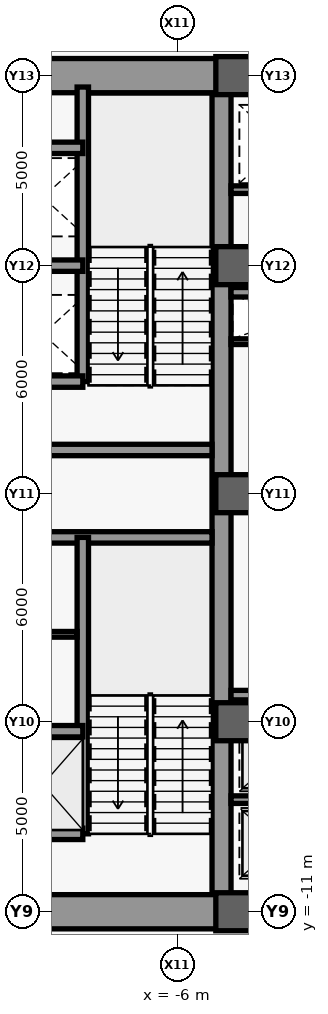
"""IFC4 building model, lengths in metres.
Left out: names, types, materials, properties, quantities, classifications, styles, units other than length and angle.
Written with IfcOpenShell. Run it as: python <this file> out.ifc"""

import sys

from ifc_helpers import new_model, si_unit, direction, frame, frame_2d, origin, origin_2d, place, context, subcontext, project, spatial, rectangle, extrude, source, transform, mapped, element, save


model = new_model("IFC4")
c1 = context("Model", 3, precision=1e-05, world=origin(), true_north=direction((0.0, 1.0)))
c2 = subcontext(c1, "Body", "Model", "MODEL_VIEW")
j1 = project(units=[si_unit("LENGTHUNIT", "METRE"), si_unit("PLANEANGLEUNIT", "RADIAN")], contexts=[c1])
p1 = place(None, origin())
s1 = spatial("IfcSite", under=j1, at=p1, CompositionType="ELEMENT")
p2 = place(p1, origin())
s2 = spatial("IfcBuilding", under=s1, at=p2, CompositionType="ELEMENT")
p3 = place(p2, frame((0.0, 0.0, 17.4)))
s3 = spatial("IfcBuildingStorey", under=s2, at=p3, CompositionType="ELEMENT", Elevation=17.4)
m1 = source(origin(), c2, "Body", "SweptSolid", [
    extrude(rectangle(XDim=21.4, YDim=0.5, at=frame_2d((10.7, 0.0))), origin(), (0.0, 0.0, 1.0), 4.48),
])
p4 = place(p3, frame((-4.85, -10.7, 0.0), z_axis=(0.0, 0.0, 1.0), x_axis=(0.0, 1.0, 0.0)))
e1 = element("IfcWall", 1, at=p4, inside=s3, PredefinedType="SHEAR", context=c2, shape_type="MappedRepresentation", body=[
    mapped(m1, transform((0.0, 0.0, 0.0), scale=1.0)),
])
m2 = source(origin(), c2, "Body", "SweptSolid", [
    extrude(rectangle(XDim=5.85, YDim=0.9, at=frame_2d((2.925, 0.0))), origin(), (0.0, 0.0, 1.0), 4.48),
])
for number, where, z_axis, x_axis in (
    (2, (-10.7, -11.0, 0.0), (0.0, 0.0, 1.0), (1.0, 0.0, 0.0)),
    (3, (-10.7, 11.0, 0.0), (0.0, 0.0, 1.0), (1.0, 0.0, 0.0)),
):
    element("IfcWall", number, at=place(p3, frame(where, z_axis=z_axis, x_axis=x_axis)), inside=s3, PredefinedType="SHEAR", context=c2, shape_type="MappedRepresentation", body=[
        mapped(m2, transform((0.0, 0.0, 0.0), scale=1.0)),
    ])
m3 = source(origin(), c2, "Body", "SweptSolid", [
    extrude(rectangle(XDim=5.6, YDim=0.3, at=frame_2d((2.8, 0.0))), origin(), (0.0, 0.0, 1.0), 4.48),
])
for number, where, z_axis, x_axis in (
    (4, (-10.7, -1.15, 0.0), (0.0, 0.0, 1.0), (1.0, 0.0, 0.0)),
    (5, (-10.7, 1.15, 0.0), (0.0, 0.0, 1.0), (1.0, 0.0, 0.0)),
):
    element("IfcWall", number, at=place(p3, frame(where, z_axis=z_axis, x_axis=x_axis)), inside=s3, PredefinedType="SHEAR", context=c2, shape_type="MappedRepresentation", body=[
        mapped(m3, transform((0.0, 0.0, 0.0), scale=1.0)),
    ])
m4 = source(origin(), c2, "Body", "SweptSolid", [
    extrude(rectangle(XDim=9.2, YDim=0.5, at=frame_2d((4.6, 0.0))), origin(), (0.0, 0.0, 1.0), 4.48),
])
p5 = place(p3, frame((-4.6, -11.0, 0.0), z_axis=(0.0, 0.0, 1.0), x_axis=(1.0, 0.0, 0.0)))
e6 = element("IfcWall", 6, at=p5, inside=s3, PredefinedType="SHEAR", context=c2, shape_type="MappedRepresentation", body=[
    mapped(m4, transform((0.0, 0.0, 0.0), scale=1.0)),
])
m5 = source(origin(), c2, "Body", "SweptSolid", [
    extrude(rectangle(XDim=1.8, YDim=2.25, at=frame_2d((0.9, 1.125))), frame((0.0, 0.26, 0.0), z_axis=(0.0, -1.0, 0.0), x_axis=(1.0, 0.0, 0.0)), (0.0, 0.0, 1.0), 0.52),
])
p6 = place(p5, frame((3.7, 0.0, 0.0)))
e7 = element("IfcOpeningElement", 7, at=p6, cuts=e6, PredefinedType="OPENING", context=c2, shape_type="MappedRepresentation", body=[
    mapped(m5, transform((0.0, 0.0, 0.0), scale=1.0)),
])
p7 = place(p3, frame((-4.6, 11.0, 0.0), z_axis=(0.0, 0.0, 1.0), x_axis=(1.0, 0.0, 0.0)))
e8 = element("IfcWall", 8, at=p7, inside=s3, PredefinedType="SHEAR", context=c2, shape_type="MappedRepresentation", body=[
    mapped(m4, transform((0.0, 0.0, 0.0), scale=1.0)),
])
p8 = place(p7, frame((3.7, 0.0, 0.0)))
e9 = element("IfcOpeningElement", 9, at=p8, cuts=e8, PredefinedType="OPENING", context=c2, shape_type="MappedRepresentation", body=[
    mapped(m5, transform((0.0, 0.0, 0.0), scale=1.0)),
])
m6 = source(origin(), c2, "Body", "SweptSolid", [
    extrude(rectangle(XDim=1.0, YDim=1.0, at=origin_2d()), origin(), (0.0, 0.0, 1.0), 4.8),
])
for number, where, z_axis, x_axis in (
    (10, (-4.5, -11.0, 0.0), (0.0, 0.0, 1.0), (1.0, 0.0, 0.0)),
    (11, (-4.5, -6.0, 0.0), (0.0, 0.0, 1.0), (1.0, 0.0, 0.0)),
    (12, (-4.5, 0.0, 0.0), (0.0, 0.0, 1.0), (1.0, 0.0, 0.0)),
    (13, (-4.5, 6.0, 0.0), (0.0, 0.0, 1.0), (1.0, 0.0, 0.0)),
    (14, (-4.5, 11.0, 0.0), (0.0, 0.0, 1.0), (1.0, 0.0, 0.0)),
):
    element("IfcColumn", number, at=place(p3, frame(where, z_axis=z_axis, x_axis=x_axis)), inside=s3, PredefinedType="COLUMN", context=c2, shape_type="MappedRepresentation", body=[
        mapped(m6, transform((0.0, 0.0, 0.0), scale=1.0)),
    ])
m7 = source(origin(), c2, "Body", "SweptSolid", [
    extrude(rectangle(XDim=7.8, YDim=0.3, at=frame_2d((3.9, 0.0))), origin(), (0.0, 0.0, 1.0), 4.48),
])
p9 = place(p3, frame((-8.5, -8.95, 0.0), z_axis=(0.0, 0.0, 1.0), x_axis=(0.0, 1.0, 0.0)))
e15 = element("IfcWall", 15, at=p9, inside=s3, PredefinedType="SHEAR", context=c2, shape_type="MappedRepresentation", body=[
    mapped(m7, transform((0.0, 0.0, 0.0), scale=1.0)),
])
m8 = source(origin(), c2, "Body", "SweptSolid", [
    extrude(rectangle(XDim=2.2, YDim=0.3, at=frame_2d((1.1, 0.0))), origin(), (0.0, 0.0, 1.0), 4.48),
])
for number, where, z_axis, x_axis in (
    (16, (-10.7, -8.95, 0.0), (0.0, 0.0, 1.0), (1.0, 0.0, 0.0)),
    (17, (-10.7, -6.25, 0.0), (0.0, 0.0, 1.0), (1.0, 0.0, 0.0)),
):
    element("IfcWall", number, at=place(p3, frame(where, z_axis=z_axis, x_axis=x_axis)), inside=s3, PredefinedType="SHEAR", context=c2, shape_type="MappedRepresentation", body=[
        mapped(m8, transform((0.0, 0.0, 0.0), scale=1.0)),
    ])
m9 = source(origin(), c2, "Body", "SweptSolid", [
    extrude(rectangle(XDim=7.75, YDim=0.3, at=frame_2d((3.875, 0.0))), origin(), (0.0, 0.0, 1.0), 4.48),
])
p10 = place(p3, frame((-8.5, 2.95, 0.0), z_axis=(0.0, 0.0, 1.0), x_axis=(0.0, 1.0, 0.0)))
e18 = element("IfcWall", 18, at=p10, inside=s3, PredefinedType="SHEAR", context=c2, shape_type="MappedRepresentation", body=[
    mapped(m9, transform((0.0, 0.0, 0.0), scale=1.0)),
])
for number, where, z_axis, x_axis in (
    (19, (-10.7, 2.95, 0.0), (0.0, 0.0, 1.0), (1.0, 0.0, 0.0)),
    (20, (-10.7, 6.0, 0.0), (0.0, 0.0, 1.0), (1.0, 0.0, 0.0)),
    (21, (-10.7, 9.1, 0.0), (0.0, 0.0, 1.0), (1.0, 0.0, 0.0)),
):
    element("IfcWall", number, at=place(p3, frame(where, z_axis=z_axis, x_axis=x_axis)), inside=s3, PredefinedType="SHEAR", context=c2, shape_type="MappedRepresentation", body=[
        mapped(m8, transform((0.0, 0.0, 0.0), scale=1.0)),
    ])
m10 = source(origin(), c2, "Body", "SweptSolid", [
    extrude(rectangle(XDim=2.05, YDim=0.15, at=frame_2d((1.025, 0.0))), origin(), (0.0, 0.0, 1.0), 4.48),
])
p11 = place(p3, frame((-10.7, -3.7, 0.0), z_axis=(0.0, 0.0, 1.0), x_axis=(1.0, 0.0, 0.0)))
e22 = element("IfcWall", 22, at=p11, inside=s3, PredefinedType="PARTITIONING", context=c2, shape_type="MappedRepresentation", body=[
    mapped(m10, transform((0.0, 0.0, 0.0), scale=1.0)),
])
m11 = source(origin(), c2, "Body", "SweptSolid", [
    extrude(rectangle(XDim=3.45, YDim=0.15, at=frame_2d((1.725, 0.0))), origin(), (0.0, 0.0, 1.0), 4.48),
])
p12 = place(p3, frame((-4.6, 4.0, 0.0), z_axis=(0.0, 0.0, 1.0), x_axis=(1.0, 0.0, 0.0)))
e23 = element("IfcWall", 23, at=p12, inside=s3, PredefinedType="PARTITIONING", context=c2, shape_type="MappedRepresentation", body=[
    mapped(m11, transform((0.0, 0.0, 0.0), scale=1.0)),
])
m12 = source(origin(), c2, "Body", "SweptSolid", [
    extrude(rectangle(XDim=2.45, YDim=0.2, at=frame_2d((1.225, 0.0))), origin(), (0.0, 0.0, 1.0), 4.48),
])
p13 = place(p3, frame((-4.6, -8.05, 0.0), z_axis=(0.0, 0.0, 1.0), x_axis=(1.0, 0.0, 0.0)))
e24 = element("IfcWall", 24, at=p13, inside=s3, PredefinedType="SHEAR", context=c2, shape_type="MappedRepresentation", body=[
    mapped(m12, transform((0.0, 0.0, 0.0), scale=1.0)),
])
m13 = source(origin(), c2, "Body", "SweptSolid", [
    extrude(rectangle(XDim=9.2, YDim=0.25, at=frame_2d((4.6, 0.0))), origin(), (0.0, 0.0, 1.0), 4.48),
])
p14 = place(p3, frame((-4.6, -5.3, 0.0), z_axis=(0.0, 0.0, 1.0), x_axis=(1.0, 0.0, 0.0)))
e25 = element("IfcWall", 25, at=p14, inside=s3, PredefinedType="SHEAR", context=c2, shape_type="MappedRepresentation", body=[
    mapped(m13, transform((0.0, 0.0, 0.0), scale=1.0)),
])
m14 = source(origin(), c2, "Body", "SweptSolid", [
    extrude(rectangle(XDim=1.05, YDim=2.2, at=frame_2d((0.525, 1.1))), frame((0.0, 0.135, 0.0), z_axis=(0.0, -1.0, 0.0), x_axis=(1.0, 0.0, 0.0)), (0.0, 0.0, 1.0), 0.27),
])
p15 = place(p14, frame((4.075, 0.0, 0.0)))
e26 = element("IfcOpeningElement", 26, at=p15, cuts=e25, PredefinedType="OPENING", context=c2, shape_type="MappedRepresentation", body=[
    mapped(m14, transform((0.0, 0.0, 0.0), scale=1.0)),
])
p16 = place(p3, frame((-4.6, 8.0, 0.0), z_axis=(0.0, 0.0, 1.0), x_axis=(1.0, 0.0, 0.0)))
e27 = element("IfcWall", 27, at=p16, inside=s3, PredefinedType="SHEAR", context=c2, shape_type="MappedRepresentation", body=[
    mapped(m12, transform((0.0, 0.0, 0.0), scale=1.0)),
])
p17 = place(p3, frame((-4.6, 5.3, 0.0), z_axis=(0.0, 0.0, 1.0), x_axis=(1.0, 0.0, 0.0)))
e28 = element("IfcWall", 28, at=p17, inside=s3, PredefinedType="SHEAR", context=c2, shape_type="MappedRepresentation", body=[
    mapped(m13, transform((0.0, 0.0, 0.0), scale=1.0)),
])
p18 = place(p17, frame((4.075, 0.0, 0.0)))
e29 = element("IfcOpeningElement", 29, at=p18, cuts=e28, PredefinedType="OPENING", context=c2, shape_type="MappedRepresentation", body=[
    mapped(m14, transform((0.0, 0.0, 0.0), scale=1.0)),
])
save(model, sys.argv[1])
